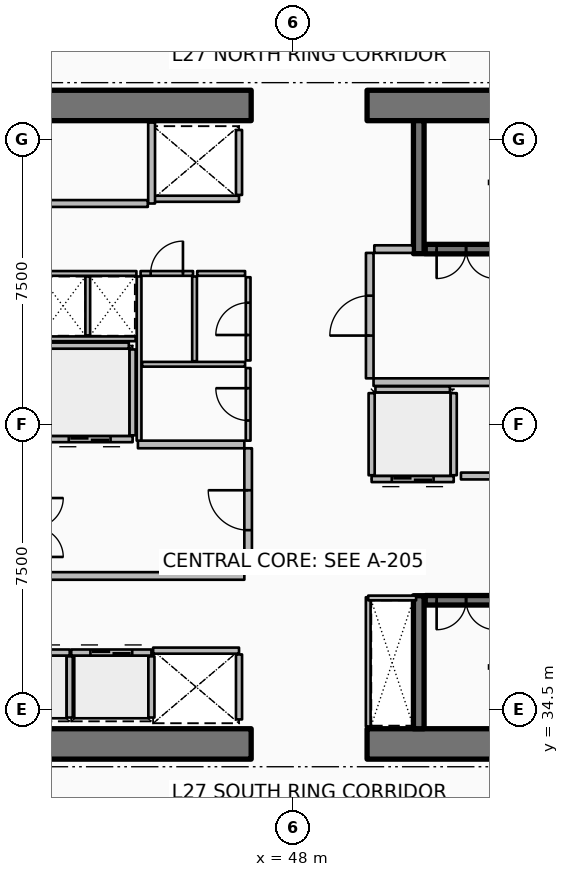
"""IFC4 building model, lengths in metres.
Left out: names, types, materials, properties, quantities, classifications, styles, units other than length and angle.
Written with IfcOpenShell. Run it as: python <this file> out.ifc"""

import sys

from ifc_helpers import new_model, si_unit, direction, frame, frame_2d, origin, place, context, subcontext, project, spatial, rectangle, extrude, element, fill, save


model = new_model("IFC4")
c1 = context("Model", 3, precision=1e-05, world=origin(), true_north=direction((0.0, 1.0)))
c2 = subcontext(c1, "Body", "Model", "MODEL_VIEW")
j1 = project(units=[si_unit("LENGTHUNIT", "METRE"), si_unit("PLANEANGLEUNIT", "RADIAN")], contexts=[c1])
p1 = place(None, origin())
s1 = spatial("IfcSite", under=j1, at=p1, CompositionType="ELEMENT")
p2 = place(p1, origin())
s2 = spatial("IfcBuilding", under=s1, at=p2, CompositionType="ELEMENT")
p3 = place(p2, frame((0.0, 0.0, 108.9)))
s3 = spatial("IfcBuildingStorey", under=s2, at=p3, CompositionType="ELEMENT", Elevation=108.9)
p4 = place(p3, frame((37.0, 33.6, 0.0), z_axis=(0.0, 0.0, 1.0), x_axis=(1.0, 0.0, 0.0)))
e1 = element("IfcWall", 1, at=p4, inside=s3, PredefinedType="SHEAR", context=c2, shape_type="SweptSolid", body=[
    extrude(rectangle(XDim=9.9, YDim=0.8, at=frame_2d((4.95, 0.0))), origin(), (0.0, 0.0, 1.0), 3.75),
])
p5 = place(p3, frame((49.95, 33.6, 0.0), z_axis=(0.0, 0.0, 1.0), x_axis=(1.0, 0.0, 0.0)))
e2 = element("IfcWall", 2, at=p5, inside=s3, PredefinedType="SHEAR", context=c2, shape_type="SweptSolid", body=[
    extrude(rectangle(XDim=9.9, YDim=0.8, at=frame_2d((4.95, 0.0))), origin(), (0.0, 0.0, 1.0), 3.75),
])
p6 = place(p3, frame((37.0, 50.4, 0.0), z_axis=(0.0, 0.0, 1.0), x_axis=(1.0, 0.0, 0.0)))
e3 = element("IfcWall", 3, at=p6, inside=s3, PredefinedType="SHEAR", context=c2, shape_type="SweptSolid", body=[
    extrude(rectangle(XDim=9.9, YDim=0.8, at=frame_2d((4.95, 0.0))), origin(), (0.0, 0.0, 1.0), 3.75),
])
p7 = place(p3, frame((49.95, 50.4, 0.0), z_axis=(0.0, 0.0, 1.0), x_axis=(1.0, 0.0, 0.0)))
e4 = element("IfcWall", 4, at=p7, inside=s3, PredefinedType="SHEAR", context=c2, shape_type="SweptSolid", body=[
    extrude(rectangle(XDim=9.9, YDim=0.8, at=frame_2d((4.95, 0.0))), origin(), (0.0, 0.0, 1.0), 3.75),
])
for number, where, z_axis, x_axis in (
    (5, (51.31, 46.5, 0.0), (0.0, 0.0, 1.0), (0.0, 1.0, 0.0)),
    (6, (51.31, 34.0, 0.0), (0.0, 0.0, 1.0), (0.0, 1.0, 0.0)),
):
    element("IfcWall", number, at=place(p3, frame(where, z_axis=z_axis, x_axis=x_axis)), inside=s3, PredefinedType="SHEAR", context=c2, shape_type="SweptSolid", body=[
        extrude(rectangle(XDim=3.5, YDim=0.28, at=frame_2d((1.75, 0.0))), origin(), (0.0, 0.0, 1.0), 3.75),
    ])
p8 = place(p3, frame((51.48, 46.62, 0.0), z_axis=(0.0, 0.0, 1.0), x_axis=(1.0, 0.0, 0.0)))
e7 = element("IfcWall", 7, at=p8, inside=s3, PredefinedType="SOLIDWALL", context=c2, shape_type="SweptSolid", body=[
    extrude(rectangle(XDim=7.54, YDim=0.25, at=frame_2d((3.77, 0.0))), origin(), (0.0, 0.0, 1.0), 3.5),
])
p9 = place(p8, frame((0.3, 0.0, 0.0)))
e8 = element("IfcOpeningElement", 8, at=p9, cuts=e7, PredefinedType="OPENING", context=c2, shape_type="SweptSolid", body=[
    extrude(rectangle(XDim=1.55, YDim=2.15, at=frame_2d((0.775, 1.075))), frame((0.0, 0.135, 0.0), z_axis=(0.0, -1.0, 0.0), x_axis=(1.0, 0.0, 0.0)), (0.0, 0.0, 1.0), 0.27),
])
p10 = place(p3, frame((51.48, 37.38, 0.0), z_axis=(0.0, 0.0, 1.0), x_axis=(1.0, 0.0, 0.0)))
e9 = element("IfcWall", 9, at=p10, inside=s3, PredefinedType="SOLIDWALL", context=c2, shape_type="SweptSolid", body=[
    extrude(rectangle(XDim=7.54, YDim=0.25, at=frame_2d((3.77, 0.0))), origin(), (0.0, 0.0, 1.0), 3.5),
])
p11 = place(p10, frame((0.3, 0.0, 0.0)))
e10 = element("IfcOpeningElement", 10, at=p11, cuts=e9, PredefinedType="OPENING", context=c2, shape_type="SweptSolid", body=[
    extrude(rectangle(XDim=1.55, YDim=2.15, at=frame_2d((0.775, 1.075))), frame((0.0, 0.135, 0.0), z_axis=(0.0, -1.0, 0.0), x_axis=(1.0, 0.0, 0.0)), (0.0, 0.0, 1.0), 0.27),
])
p12 = place(p3, frame((40.015, 36.005, 0.0), z_axis=(0.0, 0.0, 1.0), x_axis=(1.0, 0.0, 0.0)))
e11 = element("IfcWall", 11, at=p12, inside=s3, PredefinedType="PARTITIONING", context=c2, shape_type="SweptSolid", body=[
    extrude(rectangle(XDim=2.11, YDim=0.16, at=frame_2d((1.055, 0.0))), origin(), (0.0, 0.0, 1.0), 3.5),
])
p13 = place(p12, frame((0.505, 0.0, 0.0)))
e12 = element("IfcOpeningElement", 12, at=p13, cuts=e11, PredefinedType="OPENING", context=c2, shape_type="SweptSolid", body=[
    extrude(rectangle(XDim=1.1, YDim=2.1, at=frame_2d((0.55, 1.05))), frame((0.0, 0.09, 0.0), z_axis=(0.0, -1.0, 0.0), x_axis=(1.0, 0.0, 0.0)), (0.0, 0.0, 1.0), 0.18),
])
p14 = place(p3, frame((42.125, 34.295, 0.0), z_axis=(0.0, 0.0, 1.0), x_axis=(0.0, 1.0, 0.0)))
e13 = element("IfcWall", 13, at=p14, inside=s3, PredefinedType="PARTITIONING", context=c2, shape_type="SweptSolid", body=[
    extrude(rectangle(XDim=1.61, YDim=0.16, at=frame_2d((0.805, 0.0))), origin(), (0.0, 0.0, 1.0), 3.5),
])
p15 = place(p3, frame((42.165, 36.005, 0.0), z_axis=(0.0, 0.0, 1.0), x_axis=(1.0, 0.0, 0.0)))
e14 = element("IfcWall", 14, at=p15, inside=s3, PredefinedType="PARTITIONING", context=c2, shape_type="SweptSolid", body=[
    extrude(rectangle(XDim=2.11, YDim=0.16, at=frame_2d((1.055, 0.0))), origin(), (0.0, 0.0, 1.0), 3.5),
])
p16 = place(p15, frame((0.505, 0.0, 0.0)))
e15 = element("IfcOpeningElement", 15, at=p16, cuts=e14, PredefinedType="OPENING", context=c2, shape_type="SweptSolid", body=[
    extrude(rectangle(XDim=1.1, YDim=2.1, at=frame_2d((0.55, 1.05))), frame((0.0, 0.09, 0.0), z_axis=(0.0, -1.0, 0.0), x_axis=(1.0, 0.0, 0.0)), (0.0, 0.0, 1.0), 0.18),
])
p17 = place(p3, frame((44.275, 34.295, 0.0), z_axis=(0.0, 0.0, 1.0), x_axis=(0.0, 1.0, 0.0)))
e16 = element("IfcWall", 16, at=p17, inside=s3, PredefinedType="PARTITIONING", context=c2, shape_type="SweptSolid", body=[
    extrude(rectangle(XDim=1.61, YDim=0.16, at=frame_2d((0.805, 0.0))), origin(), (0.0, 0.0, 1.0), 3.5),
])
p18 = place(p3, frame((46.58, 47.945, 0.0), z_axis=(0.0, 0.0, 1.0), x_axis=(-1.0, 0.0, 0.0)))
e17 = element("IfcWall", 17, at=p18, inside=s3, PredefinedType="PARTITIONING", context=c2, shape_type="SweptSolid", body=[
    extrude(rectangle(XDim=2.26, YDim=0.16, at=frame_2d((1.13, 0.0))), origin(), (0.0, 0.0, 1.0), 3.5),
])
p19 = place(p3, frame((46.58, 48.045, 0.0), z_axis=(0.0, 0.0, 1.0), x_axis=(0.0, 1.0, 0.0)))
e18 = element("IfcWall", 18, at=p19, inside=s3, PredefinedType="PARTITIONING", context=c2, shape_type="SweptSolid", body=[
    extrude(rectangle(XDim=1.71, YDim=0.16, at=frame_2d((0.855, 0.0))), origin(), (0.0, 0.0, 1.0), 3.5),
])
p20 = place(p3, frame((44.32, 36.055, 0.0), z_axis=(0.0, 0.0, 1.0), x_axis=(1.0, 0.0, 0.0)))
e19 = element("IfcWall", 19, at=p20, inside=s3, PredefinedType="PARTITIONING", context=c2, shape_type="SweptSolid", body=[
    extrude(rectangle(XDim=2.26, YDim=0.16, at=frame_2d((1.13, 0.0))), origin(), (0.0, 0.0, 1.0), 3.5),
])
p21 = place(p3, frame((46.58, 34.245, 0.0), z_axis=(0.0, 0.0, 1.0), x_axis=(0.0, 1.0, 0.0)))
e20 = element("IfcWall", 20, at=p21, inside=s3, PredefinedType="PARTITIONING", context=c2, shape_type="SweptSolid", body=[
    extrude(rectangle(XDim=1.71, YDim=0.16, at=frame_2d((0.855, 0.0))), origin(), (0.0, 0.0, 1.0), 3.5),
])
p22 = place(p3, frame((43.78, 41.62, 0.0), z_axis=(0.0, 0.0, 1.0), x_axis=(-1.0, 0.0, 0.0)))
e21 = element("IfcWall", 21, at=p22, inside=s3, PredefinedType="PARTITIONING", context=c2, shape_type="SweptSolid", body=[
    extrude(rectangle(XDim=2.26, YDim=0.16, at=frame_2d((1.13, 0.0))), origin(), (0.0, 0.0, 1.0), 3.5),
])
p23 = place(p22, frame((0.58, 0.0, 0.0)))
e22 = element("IfcOpeningElement", 22, at=p23, cuts=e21, PredefinedType="OPENING", context=c2, shape_type="SweptSolid", body=[
    extrude(rectangle(XDim=1.1, YDim=2.1, at=frame_2d((0.55, 1.05))), frame((0.0, 0.09, 0.0), z_axis=(0.0, -1.0, 0.0), x_axis=(1.0, 0.0, 0.0)), (0.0, 0.0, 1.0), 0.18),
])
p24 = place(p3, frame((43.78, 41.72, 0.0), z_axis=(0.0, 0.0, 1.0), x_axis=(0.0, 1.0, 0.0)))
e23 = element("IfcWall", 23, at=p24, inside=s3, PredefinedType="PARTITIONING", context=c2, shape_type="SweptSolid", body=[
    extrude(rectangle(XDim=2.26, YDim=0.16, at=frame_2d((1.13, 0.0))), origin(), (0.0, 0.0, 1.0), 3.5),
])
p25 = place(p3, frame((41.62, 44.08, 0.0), z_axis=(0.0, 0.0, 1.0), x_axis=(1.0, 0.0, 0.0)))
e24 = element("IfcWall", 24, at=p25, inside=s3, PredefinedType="PARTITIONING", context=c2, shape_type="SweptSolid", body=[
    extrude(rectangle(XDim=2.06, YDim=0.16, at=frame_2d((1.03, 0.0))), origin(), (0.0, 0.0, 1.0), 3.5),
])
p26 = place(p3, frame((52.23, 40.57, 0.0), z_axis=(0.0, 0.0, 1.0), x_axis=(-1.0, 0.0, 0.0)))
e25 = element("IfcWall", 25, at=p26, inside=s3, PredefinedType="PARTITIONING", context=c2, shape_type="SweptSolid", body=[
    extrude(rectangle(XDim=2.16, YDim=0.16, at=frame_2d((1.08, 0.0))), origin(), (0.0, 0.0, 1.0), 3.5),
])
p27 = place(p26, frame((0.53, 0.0, 0.0)))
e26 = element("IfcOpeningElement", 26, at=p27, cuts=e25, PredefinedType="OPENING", context=c2, shape_type="SweptSolid", body=[
    extrude(rectangle(XDim=1.1, YDim=2.1, at=frame_2d((0.55, 1.05))), frame((0.0, 0.09, 0.0), z_axis=(0.0, -1.0, 0.0), x_axis=(1.0, 0.0, 0.0)), (0.0, 0.0, 1.0), 0.18),
])
for number, where, z_axis, x_axis in (
    (27, (52.23, 40.67, 0.0), (0.0, 0.0, 1.0), (0.0, 1.0, 0.0)),
    (28, (50.07, 40.67, 0.0), (0.0, 0.0, 1.0), (0.0, 1.0, 0.0)),
):
    element("IfcWall", number, at=place(p3, frame(where, z_axis=z_axis, x_axis=x_axis)), inside=s3, PredefinedType="PARTITIONING", context=c2, shape_type="SweptSolid", body=[
        extrude(rectangle(XDim=2.16, YDim=0.16, at=frame_2d((1.08, 0.0))), origin(), (0.0, 0.0, 1.0), 3.5),
    ])
p28 = place(p3, frame((50.17, 42.93, 0.0), z_axis=(0.0, 0.0, 1.0), x_axis=(1.0, 0.0, 0.0)))
e29 = element("IfcWall", 29, at=p28, inside=s3, PredefinedType="PARTITIONING", context=c2, shape_type="SweptSolid", body=[
    extrude(rectangle(XDim=1.96, YDim=0.16, at=frame_2d((0.98, 0.0))), origin(), (0.0, 0.0, 1.0), 3.5),
])
p29 = place(p3, frame((37.92, 47.82, 0.0), z_axis=(0.0, 0.0, 1.0), x_axis=(1.0, 0.0, 0.0)))
e30 = element("IfcWall", 30, at=p29, inside=s3, PredefinedType="PARTITIONING", context=c2, shape_type="SweptSolid", body=[
    extrude(rectangle(XDim=6.26, YDim=0.18, at=frame_2d((3.13, 0.0))), origin(), (0.0, 0.0, 1.0), 3.5),
])
p30 = place(p29, frame((2.705, 0.0, 0.0)))
e31 = element("IfcOpeningElement", 31, at=p30, cuts=e30, PredefinedType="OPENING", context=c2, shape_type="SweptSolid", body=[
    extrude(rectangle(XDim=0.85, YDim=2.06, at=frame_2d((0.425, 1.03))), frame((0.0, 0.1, 0.0), z_axis=(0.0, -1.0, 0.0), x_axis=(1.0, 0.0, 0.0)), (0.0, 0.0, 1.0), 0.2),
])
p31 = place(p3, frame((44.28, 47.82, 0.0), z_axis=(0.0, 0.0, 1.0), x_axis=(0.0, 1.0, 0.0)))
e32 = element("IfcWall", 32, at=p31, inside=s3, PredefinedType="PARTITIONING", context=c2, shape_type="SweptSolid", body=[
    extrude(rectangle(XDim=2.13, YDim=0.18, at=frame_2d((1.065, 0.0))), origin(), (0.0, 0.0, 1.0), 3.5),
])
p32 = place(p3, frame((52.42, 40.65, 0.0), z_axis=(0.0, 0.0, 1.0), x_axis=(1.0, 0.0, 0.0)))
e33 = element("IfcWall", 33, at=p32, inside=s3, PredefinedType="PARTITIONING", context=c2, shape_type="SweptSolid", body=[
    extrude(rectangle(XDim=6.5, YDim=0.18, at=frame_2d((3.25, 0.0))), origin(), (0.0, 0.0, 1.0), 3.5),
])
p33 = place(p32, frame((2.825, 0.0, 0.0)))
e34 = element("IfcOpeningElement", 34, at=p33, cuts=e33, PredefinedType="OPENING", context=c2, shape_type="SweptSolid", body=[
    extrude(rectangle(XDim=0.85, YDim=2.06, at=frame_2d((0.425, 1.03))), frame((0.0, 0.1, 0.0), z_axis=(0.0, -1.0, 0.0), x_axis=(1.0, 0.0, 0.0)), (0.0, 0.0, 1.0), 0.2),
])
p34 = place(p3, frame((41.35, 38.02, 0.0), z_axis=(0.0, 0.0, 1.0), x_axis=(1.0, 0.0, 0.0)))
e35 = element("IfcWall", 35, at=p34, inside=s3, PredefinedType="PARTITIONING", context=c2, shape_type="SweptSolid", body=[
    extrude(rectangle(XDim=5.37, YDim=0.2, at=frame_2d((2.685, 0.0))), origin(), (0.0, 0.0, 1.0), 3.5),
])
p35 = place(p3, frame((43.92, 41.48, 0.0), z_axis=(0.0, 0.0, 1.0), x_axis=(1.0, 0.0, 0.0)))
e36 = element("IfcWall", 36, at=p35, inside=s3, PredefinedType="PARTITIONING", context=c2, shape_type="SweptSolid", body=[
    extrude(rectangle(XDim=2.8, YDim=0.2, at=frame_2d((1.4, 0.0))), origin(), (0.0, 0.0, 1.0), 3.5),
])
p36 = place(p3, frame((46.82, 38.12, 0.0), z_axis=(0.0, 0.0, 1.0), x_axis=(0.0, 1.0, 0.0)))
e37 = element("IfcWall", 37, at=p36, inside=s3, PredefinedType="PARTITIONING", context=c2, shape_type="SweptSolid", body=[
    extrude(rectangle(XDim=3.26, YDim=0.2, at=frame_2d((1.63, 0.0))), origin(), (0.0, 0.0, 1.0), 3.5),
])
p37 = place(p36, frame((1.105, 0.0, 0.0)))
e38 = element("IfcOpeningElement", 38, at=p37, cuts=e37, PredefinedType="OPENING", context=c2, shape_type="SweptSolid", body=[
    extrude(rectangle(XDim=1.05, YDim=2.1, at=frame_2d((0.525, 1.05))), frame((0.0, 0.11, 0.0), z_axis=(0.0, -1.0, 0.0), x_axis=(1.0, 0.0, 0.0)), (0.0, 0.0, 1.0), 0.22),
])
p38 = place(p3, frame((50.12, 43.12, 0.0), z_axis=(0.0, 0.0, 1.0), x_axis=(1.0, 0.0, 0.0)))
e39 = element("IfcWall", 39, at=p38, inside=s3, PredefinedType="PARTITIONING", context=c2, shape_type="SweptSolid", body=[
    extrude(rectangle(XDim=8.88, YDim=0.2, at=frame_2d((4.44, 0.0))), origin(), (0.0, 0.0, 1.0), 3.5),
])
p39 = place(p3, frame((50.14, 46.62, 0.0), z_axis=(0.0, 0.0, 1.0), x_axis=(1.0, 0.0, 0.0)))
e40 = element("IfcWall", 40, at=p39, inside=s3, PredefinedType="PARTITIONING", context=c2, shape_type="SweptSolid", body=[
    extrude(rectangle(XDim=1.02, YDim=0.2, at=frame_2d((0.51, 0.0))), origin(), (0.0, 0.0, 1.0), 3.5),
])
p40 = place(p3, frame((50.02, 43.22, 0.0), z_axis=(0.0, 0.0, 1.0), x_axis=(0.0, 1.0, 0.0)))
e41 = element("IfcWall", 41, at=p40, inside=s3, PredefinedType="PARTITIONING", context=c2, shape_type="SweptSolid", body=[
    extrude(rectangle(XDim=3.3, YDim=0.2, at=frame_2d((1.65, 0.0))), origin(), (0.0, 0.0, 1.0), 3.5),
])
p41 = place(p40, frame((1.125, 0.0, 0.0)))
e42 = element("IfcOpeningElement", 42, at=p41, cuts=e41, PredefinedType="OPENING", context=c2, shape_type="SweptSolid", body=[
    extrude(rectangle(XDim=1.05, YDim=2.1, at=frame_2d((0.525, 1.05))), frame((0.0, 0.11, 0.0), z_axis=(0.0, -1.0, 0.0), x_axis=(1.0, 0.0, 0.0)), (0.0, 0.0, 1.0), 0.22),
])
p42 = place(p3, frame((41.36, 44.26, 0.0), z_axis=(0.0, 0.0, 1.0), x_axis=(1.0, 0.0, 0.0)))
e43 = element("IfcWall", 43, at=p42, inside=s3, PredefinedType="PARTITIONING", context=c2, shape_type="SweptSolid", body=[
    extrude(rectangle(XDim=2.5, YDim=0.125, at=frame_2d((1.25, 0.0))), origin(), (0.0, 0.0, 1.0), 2.94),
])
p43 = place(p3, frame((42.6, 44.35, 0.0), z_axis=(0.0, 0.0, 1.0), x_axis=(0.0, 1.0, 0.0)))
e44 = element("IfcWall", 44, at=p43, inside=s3, PredefinedType="PARTITIONING", context=c2, shape_type="SweptSolid", body=[
    extrude(rectangle(XDim=1.55, YDim=0.125, at=frame_2d((0.775, 0.0))), origin(), (0.0, 0.0, 1.0), 2.94),
])
p44 = place(p3, frame((49.98, 34.06, 0.0), z_axis=(0.0, 0.0, 1.0), x_axis=(0.0, 1.0, 0.0)))
e45 = element("IfcWall", 45, at=p44, inside=s3, PredefinedType="PARTITIONING", context=c2, shape_type="SweptSolid", body=[
    extrude(rectangle(XDim=3.4, YDim=0.125, at=frame_2d((1.7, 0.0))), origin(), (0.0, 0.0, 1.0), 2.94),
])
p45 = place(p3, frame((49.98, 37.44, 0.0), z_axis=(0.0, 0.0, 1.0), x_axis=(1.0, 0.0, 0.0)))
e46 = element("IfcWall", 46, at=p45, inside=s3, PredefinedType="PARTITIONING", context=c2, shape_type="SweptSolid", body=[
    extrude(rectangle(XDim=1.26, YDim=0.125, at=frame_2d((0.63, 0.0))), origin(), (0.0, 0.0, 1.0), 2.94),
])
p46 = place(p3, frame((43.95, 41.58, 0.0), z_axis=(0.0, 0.0, 1.0), x_axis=(0.0, 1.0, 0.0)))
e47 = element("IfcWall", 47, at=p46, inside=s3, PredefinedType="PARTITIONING", context=c2, shape_type="SweptSolid", body=[
    extrude(rectangle(XDim=4.32, YDim=0.125, at=frame_2d((2.16, 0.0))), origin(), (0.0, 0.0, 1.0), 2.94),
])
p47 = place(p3, frame((44.03, 43.59, 0.0), z_axis=(0.0, 0.0, 1.0), x_axis=(1.0, 0.0, 0.0)))
e48 = element("IfcWall", 48, at=p47, inside=s3, PredefinedType="PARTITIONING", context=c2, shape_type="SweptSolid", body=[
    extrude(rectangle(XDim=2.71, YDim=0.125, at=frame_2d((1.355, 0.0))), origin(), (0.0, 0.0, 1.0), 2.94),
])
p48 = place(p3, frame((45.41, 43.67, 0.0), z_axis=(0.0, 0.0, 1.0), x_axis=(0.0, 1.0, 0.0)))
e49 = element("IfcWall", 49, at=p48, inside=s3, PredefinedType="PARTITIONING", context=c2, shape_type="SweptSolid", body=[
    extrude(rectangle(XDim=2.23, YDim=0.125, at=frame_2d((1.115, 0.0))), origin(), (0.0, 0.0, 1.0), 2.94),
])
p49 = place(p3, frame((46.82, 41.58, 0.0), z_axis=(0.0, 0.0, 1.0), x_axis=(0.0, 1.0, 0.0)))
e50 = element("IfcWall", 50, at=p49, inside=s3, PredefinedType="PARTITIONING", context=c2, shape_type="SweptSolid", body=[
    extrude(rectangle(XDim=1.91, YDim=0.125, at=frame_2d((0.955, 0.0))), origin(), (0.0, 0.0, 1.0), 2.94),
])
p50 = place(p49, frame((0.53, 0.0, 0.0)))
e51 = element("IfcOpeningElement", 51, at=p50, cuts=e50, PredefinedType="OPENING", context=c2, shape_type="SweptSolid", body=[
    extrude(rectangle(XDim=0.85, YDim=2.06, at=frame_2d((0.425, 1.03))), frame((0.0, 0.073, 0.0), z_axis=(0.0, -1.0, 0.0), x_axis=(1.0, 0.0, 0.0)), (0.0, 0.0, 1.0), 0.145),
])
p51 = place(p3, frame((46.82, 43.69, 0.0), z_axis=(0.0, 0.0, 1.0), x_axis=(0.0, 1.0, 0.0)))
e52 = element("IfcWall", 52, at=p51, inside=s3, PredefinedType="PARTITIONING", context=c2, shape_type="SweptSolid", body=[
    extrude(rectangle(XDim=2.19, YDim=0.125, at=frame_2d((1.095, 0.0))), origin(), (0.0, 0.0, 1.0), 2.94),
])
p52 = place(p51, frame((0.67, 0.0, 0.0)))
e53 = element("IfcOpeningElement", 53, at=p52, cuts=e52, PredefinedType="OPENING", context=c2, shape_type="SweptSolid", body=[
    extrude(rectangle(XDim=0.85, YDim=2.06, at=frame_2d((0.425, 1.03))), frame((0.0, 0.073, 0.0), z_axis=(0.0, -1.0, 0.0), x_axis=(1.0, 0.0, 0.0)), (0.0, 0.0, 1.0), 0.145),
])
p53 = place(p3, frame((41.35, 45.98, 0.0), z_axis=(0.0, 0.0, 1.0), x_axis=(1.0, 0.0, 0.0)))
e54 = element("IfcWall", 54, at=p53, inside=s3, PredefinedType="PARTITIONING", context=c2, shape_type="SweptSolid", body=[
    extrude(rectangle(XDim=2.53, YDim=0.125, at=frame_2d((1.265, 0.0))), origin(), (0.0, 0.0, 1.0), 2.94),
])
p54 = place(p3, frame((43.99, 45.98, 0.0), z_axis=(0.0, 0.0, 1.0), x_axis=(1.0, 0.0, 0.0)))
e55 = element("IfcWall", 55, at=p54, inside=s3, PredefinedType="PARTITIONING", context=c2, shape_type="SweptSolid", body=[
    extrude(rectangle(XDim=1.38, YDim=0.125, at=frame_2d((0.69, 0.0))), origin(), (0.0, 0.0, 1.0), 2.94),
])
p55 = place(p54, frame((0.265, 0.0, 0.0)))
e56 = element("IfcOpeningElement", 56, at=p55, cuts=e55, PredefinedType="OPENING", context=c2, shape_type="SweptSolid", body=[
    extrude(rectangle(XDim=0.85, YDim=2.06, at=frame_2d((0.425, 1.03))), frame((0.0, 0.073, 0.0), z_axis=(0.0, -1.0, 0.0), x_axis=(1.0, 0.0, 0.0)), (0.0, 0.0, 1.0), 0.145),
])
p56 = place(p3, frame((45.48, 45.98, 0.0), z_axis=(0.0, 0.0, 1.0), x_axis=(1.0, 0.0, 0.0)))
e57 = element("IfcWall", 57, at=p56, inside=s3, PredefinedType="PARTITIONING", context=c2, shape_type="SweptSolid", body=[
    extrude(rectangle(XDim=1.26, YDim=0.125, at=frame_2d((0.63, 0.0))), origin(), (0.0, 0.0, 1.0), 2.94),
])
p57 = place(p9, origin())
e58 = element("IfcDoor", 58, at=p57, inside=s3, OperationType="DOUBLE_DOOR_SINGLE_SWING", PredefinedType="DOOR", context=c2, shape_type="SweptSolid", body=[
    extrude(rectangle(XDim=1.55, YDim=2.15, at=frame_2d((0.775, 1.075))), frame((0.0, 0.025, 0.0), z_axis=(0.0, -1.0, 0.0), x_axis=(1.0, 0.0, 0.0)), (0.0, 0.0, 1.0), 0.05),
])
fill(e8, e58)
p58 = place(p11, origin())
e59 = element("IfcDoor", 59, at=p58, inside=s3, OperationType="DOUBLE_DOOR_SINGLE_SWING", PredefinedType="DOOR", context=c2, shape_type="SweptSolid", body=[
    extrude(rectangle(XDim=1.55, YDim=2.15, at=frame_2d((0.775, 1.075))), frame((0.0, 0.025, 0.0), z_axis=(0.0, -1.0, 0.0), x_axis=(1.0, 0.0, 0.0)), (0.0, 0.0, 1.0), 0.05),
])
fill(e10, e59)
p59 = place(p16, origin())
e60 = element("IfcDoor", 60, at=p59, inside=s3, OperationType="DOUBLE_DOOR_SLIDING", PredefinedType="DOOR", context=c2, shape_type="SweptSolid", body=[
    extrude(rectangle(XDim=1.1, YDim=2.1, at=frame_2d((0.55, 1.05))), frame((0.0, 0.025, 0.0), z_axis=(0.0, -1.0, 0.0), x_axis=(1.0, 0.0, 0.0)), (0.0, 0.0, 1.0), 0.05),
])
fill(e15, e60)
p60 = place(p23, origin())
e61 = element("IfcDoor", 61, at=p60, inside=s3, OperationType="DOUBLE_DOOR_SLIDING", PredefinedType="DOOR", context=c2, shape_type="SweptSolid", body=[
    extrude(rectangle(XDim=1.1, YDim=2.1, at=frame_2d((0.55, 1.05))), frame((0.0, 0.025, 0.0), z_axis=(0.0, -1.0, 0.0), x_axis=(1.0, 0.0, 0.0)), (0.0, 0.0, 1.0), 0.05),
])
fill(e22, e61)
p61 = place(p27, origin())
e62 = element("IfcDoor", 62, at=p61, inside=s3, OperationType="DOUBLE_DOOR_SLIDING", PredefinedType="DOOR", context=c2, shape_type="SweptSolid", body=[
    extrude(rectangle(XDim=1.1, YDim=2.1, at=frame_2d((0.55, 1.05))), frame((0.0, 0.025, 0.0), z_axis=(0.0, -1.0, 0.0), x_axis=(1.0, 0.0, 0.0)), (0.0, 0.0, 1.0), 0.05),
])
fill(e26, e62)
p62 = place(p37, origin())
e63 = element("IfcDoor", 63, at=p62, inside=s3, OperationType="SINGLE_SWING_RIGHT", PredefinedType="DOOR", context=c2, shape_type="SweptSolid", body=[
    extrude(rectangle(XDim=1.05, YDim=2.1, at=frame_2d((0.525, 1.05))), frame((0.0, 0.025, 0.0), z_axis=(0.0, -1.0, 0.0), x_axis=(1.0, 0.0, 0.0)), (0.0, 0.0, 1.0), 0.05),
])
fill(e38, e63)
p63 = place(p41, origin())
e64 = element("IfcDoor", 64, at=p63, inside=s3, OperationType="SINGLE_SWING_LEFT", PredefinedType="DOOR", context=c2, shape_type="SweptSolid", body=[
    extrude(rectangle(XDim=1.05, YDim=2.1, at=frame_2d((0.525, 1.05))), frame((0.0, 0.025, 0.0), z_axis=(0.0, -1.0, 0.0), x_axis=(1.0, 0.0, 0.0)), (0.0, 0.0, 1.0), 0.05),
])
fill(e42, e64)
p64 = place(p50, origin())
e65 = element("IfcDoor", 65, at=p64, inside=s3, OperationType="SINGLE_SWING_RIGHT", PredefinedType="DOOR", context=c2, shape_type="SweptSolid", body=[
    extrude(rectangle(XDim=0.85, YDim=2.06, at=frame_2d((0.425, 1.03))), frame((0.0, 0.025, 0.0), z_axis=(0.0, -1.0, 0.0), x_axis=(1.0, 0.0, 0.0)), (0.0, 0.0, 1.0), 0.05),
])
fill(e51, e65)
p65 = place(p52, origin())
e66 = element("IfcDoor", 66, at=p65, inside=s3, OperationType="SINGLE_SWING_LEFT", PredefinedType="DOOR", context=c2, shape_type="SweptSolid", body=[
    extrude(rectangle(XDim=0.85, YDim=2.06, at=frame_2d((0.425, 1.03))), frame((0.0, 0.025, 0.0), z_axis=(0.0, -1.0, 0.0), x_axis=(1.0, 0.0, 0.0)), (0.0, 0.0, 1.0), 0.05),
])
fill(e53, e66)
p66 = place(p55, origin())
e67 = element("IfcDoor", 67, at=p66, inside=s3, OperationType="SINGLE_SWING_RIGHT", PredefinedType="DOOR", context=c2, shape_type="SweptSolid", body=[
    extrude(rectangle(XDim=0.85, YDim=2.06, at=frame_2d((0.425, 1.03))), frame((0.0, 0.025, 0.0), z_axis=(0.0, -1.0, 0.0), x_axis=(1.0, 0.0, 0.0)), (0.0, 0.0, 1.0), 0.05),
])
fill(e56, e67)
save(model, sys.argv[1])
